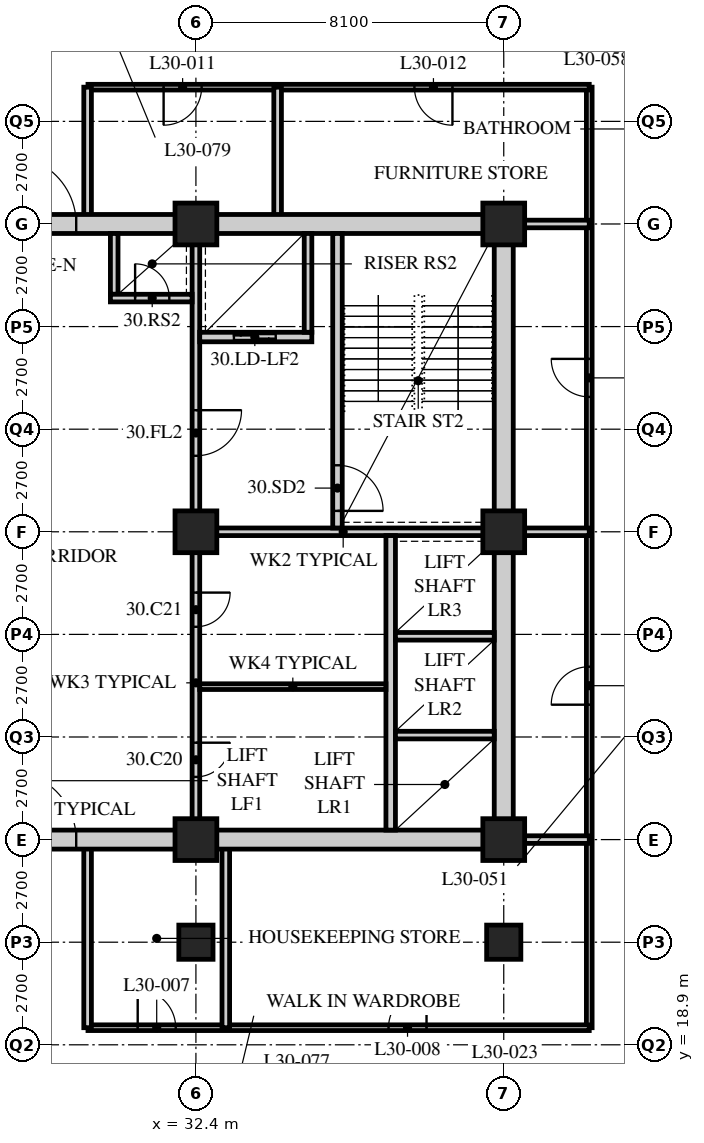
"""IFC4 building model, lengths in metres.
Left out: names, types, materials, properties, quantities, classifications, styles, units other than length and angle.
Written with IfcOpenShell. Run it as: python <this file> out.ifc"""

import sys

from ifc_helpers import new_model, si_unit, direction, frame, frame_2d, origin, origin_2d, place, context, subcontext, project, spatial, rectangle, hollow_rectangle, extrude, element, fill, save


model = new_model("IFC4")
c1 = context("Model", 3, precision=1e-05, world=origin(), true_north=direction((0.0, 1.0)))
c2 = subcontext(c1, "Body", "Model", "MODEL_VIEW")
j1 = project(units=[si_unit("LENGTHUNIT", "METRE"), si_unit("PLANEANGLEUNIT", "RADIAN")], contexts=[c1])
p1 = place(None, origin())
s1 = spatial("IfcSite", under=j1, at=p1, CompositionType="ELEMENT")
p2 = place(p1, origin())
s2 = spatial("IfcBuilding", under=s1, at=p2, CompositionType="ELEMENT")
p3 = place(p2, frame((0.0, 0.0, 120.4)))
s3 = spatial("IfcBuildingStorey", under=s2, at=p3, CompositionType="ELEMENT", Elevation=120.4)
p4 = place(p3, frame((32.4, 21.6, 0.0), z_axis=(0.0, 0.0, 1.0), x_axis=(1.0, 0.0, 0.0)))
e1 = element("IfcColumn", 1, at=p4, inside=s3, PredefinedType="COLUMN", context=c2, shape_type="SweptSolid", body=[
    extrude(hollow_rectangle(XDim=0.9, YDim=0.9, WallThickness=0.09, at=origin_2d()), origin(), (0.0, 0.0, 1.0), 3.4),
])
for number, where, z_axis, x_axis in (
    (2, (32.4, 24.3, 0.0), (0.0, 0.0, 1.0), (1.0, 0.0, 0.0)),
    (3, (32.4, 32.4, 0.0), (0.0, 0.0, 1.0), (1.0, 0.0, 0.0)),
    (4, (32.4, 40.5, 0.0), (0.0, 0.0, 1.0), (1.0, 0.0, 0.0)),
):
    element("IfcColumn", number, at=place(p3, frame(where, z_axis=z_axis, x_axis=x_axis)), inside=s3, PredefinedType="COLUMN", context=c2, shape_type="SweptSolid", body=[
        extrude(hollow_rectangle(XDim=1.1, YDim=1.1, WallThickness=0.1, at=origin_2d()), origin(), (0.0, 0.0, 1.0), 3.4),
    ])
p5 = place(p3, frame((40.5, 21.6, 0.0), z_axis=(0.0, 0.0, 1.0), x_axis=(1.0, 0.0, 0.0)))
e5 = element("IfcColumn", 5, at=p5, inside=s3, PredefinedType="COLUMN", context=c2, shape_type="SweptSolid", body=[
    extrude(hollow_rectangle(XDim=0.9, YDim=0.9, WallThickness=0.09, at=origin_2d()), origin(), (0.0, 0.0, 1.0), 3.4),
])
for number, where, z_axis, x_axis in (
    (6, (40.5, 24.3, 0.0), (0.0, 0.0, 1.0), (1.0, 0.0, 0.0)),
    (7, (40.5, 32.4, 0.0), (0.0, 0.0, 1.0), (1.0, 0.0, 0.0)),
    (8, (40.5, 40.5, 0.0), (0.0, 0.0, 1.0), (1.0, 0.0, 0.0)),
):
    element("IfcColumn", number, at=place(p3, frame(where, z_axis=z_axis, x_axis=x_axis)), inside=s3, PredefinedType="COLUMN", context=c2, shape_type="SweptSolid", body=[
        extrude(hollow_rectangle(XDim=1.1, YDim=1.1, WallThickness=0.1, at=origin_2d()), origin(), (0.0, 0.0, 1.0), 3.4),
    ])
p6 = place(p3, frame((42.75, 19.35, 0.0), z_axis=(0.0, 0.0, 1.0), x_axis=(0.0, 1.0, 0.0)))
e9 = element("IfcWall", 9, at=p6, inside=s3, PredefinedType="PARTITIONING", context=c2, shape_type="SweptSolid", body=[
    extrude(rectangle(XDim=24.75, YDim=0.15, at=frame_2d((12.375, 0.0))), origin(), (0.0, 0.0, 1.0), 3.19),
])
p7 = place(p6, frame((8.5, 0.0, 0.0)))
e10 = element("IfcOpeningElement", 10, at=p7, cuts=e9, PredefinedType="OPENING", context=c2, shape_type="SweptSolid", body=[
    extrude(rectangle(XDim=1.0, YDim=2.1, at=frame_2d((0.5, 1.05))), frame((0.0, 0.085, 0.0), z_axis=(0.0, -1.0, 0.0), x_axis=(1.0, 0.0, 0.0)), (0.0, 0.0, 1.0), 0.17),
])
p8 = place(p6, frame((16.6, 0.0, 0.0)))
e11 = element("IfcOpeningElement", 11, at=p8, cuts=e9, PredefinedType="OPENING", context=c2, shape_type="SweptSolid", body=[
    extrude(rectangle(XDim=1.0, YDim=2.1, at=frame_2d((0.5, 1.05))), frame((0.0, 0.085, 0.0), z_axis=(0.0, -1.0, 0.0), x_axis=(1.0, 0.0, 0.0)), (0.0, 0.0, 1.0), 0.17),
])
p9 = place(p3, frame((42.75, 44.1, 0.0), z_axis=(0.0, 0.0, 1.0), x_axis=(-1.0, 0.0, 0.0)))
e12 = element("IfcWall", 12, at=p9, inside=s3, PredefinedType="PARTITIONING", context=c2, shape_type="SweptSolid", body=[
    extrude(rectangle(XDim=13.19, YDim=0.15, at=frame_2d((6.595, 0.0))), origin(), (0.0, 0.0, 1.0), 3.19),
])
p10 = place(p9, frame((10.2, 0.0, 0.0)))
e13 = element("IfcOpeningElement", 13, at=p10, cuts=e12, PredefinedType="OPENING", context=c2, shape_type="SweptSolid", body=[
    extrude(rectangle(XDim=1.0, YDim=2.1, at=frame_2d((0.5, 1.05))), frame((0.0, 0.085, 0.0), z_axis=(0.0, -1.0, 0.0), x_axis=(1.0, 0.0, 0.0)), (0.0, 0.0, 1.0), 0.17),
])
p11 = place(p9, frame((3.6, 0.0, 0.0)))
e14 = element("IfcOpeningElement", 14, at=p11, cuts=e12, PredefinedType="OPENING", context=c2, shape_type="SweptSolid", body=[
    extrude(rectangle(XDim=1.0, YDim=2.1, at=frame_2d((0.5, 1.05))), frame((0.0, 0.085, 0.0), z_axis=(0.0, -1.0, 0.0), x_axis=(1.0, 0.0, 0.0)), (0.0, 0.0, 1.0), 0.17),
])
p12 = place(p3, frame((29.56, 19.35, 0.0), z_axis=(0.0, 0.0, 1.0), x_axis=(1.0, 0.0, 0.0)))
e15 = element("IfcWall", 15, at=p12, inside=s3, PredefinedType="PARTITIONING", context=c2, shape_type="SweptSolid", body=[
    extrude(rectangle(XDim=13.19, YDim=0.15, at=frame_2d((6.595, 0.0))), origin(), (0.0, 0.0, 1.0), 3.19),
])
p13 = place(p12, frame((1.308, 0.0, 0.0)))
e16 = element("IfcOpeningElement", 16, at=p13, cuts=e15, PredefinedType="OPENING", context=c2, shape_type="SweptSolid", body=[
    extrude(rectangle(XDim=1.0, YDim=2.1, at=frame_2d((0.5, 1.05))), frame((0.0, 0.085, 0.0), z_axis=(0.0, -1.0, 0.0), x_axis=(1.0, 0.0, 0.0)), (0.0, 0.0, 1.0), 0.17),
])
p14 = place(p12, frame((7.908, 0.0, 0.0)))
e17 = element("IfcOpeningElement", 17, at=p14, cuts=e15, PredefinedType="OPENING", context=c2, shape_type="SweptSolid", body=[
    extrude(rectangle(XDim=1.0, YDim=2.1, at=frame_2d((0.5, 1.05))), frame((0.0, 0.085, 0.0), z_axis=(0.0, -1.0, 0.0), x_axis=(1.0, 0.0, 0.0)), (0.0, 0.0, 1.0), 0.17),
])
p15 = place(p3, frame((40.5, 32.4, 0.0), z_axis=(0.0, 0.0, 1.0), x_axis=(1.0, 0.0, 0.0)))
e18 = element("IfcWall", 18, at=p15, inside=s3, PredefinedType="SOLIDWALL", context=c2, shape_type="SweptSolid", body=[
    extrude(rectangle(XDim=2.25, YDim=0.2, at=frame_2d((1.125, 0.0))), origin(), (0.0, 0.0, 1.0), 3.19),
])
for number, where, z_axis, x_axis in (
    (19, (33.186, 19.35, 0.0), (0.0, 0.0, 1.0), (0.0, 1.0, 0.0)),
    (20, (29.55, 19.35, 0.0), (0.0, 0.0, 1.0), (0.0, 1.0, 0.0)),
):
    element("IfcWall", number, at=place(p3, frame(where, z_axis=z_axis, x_axis=x_axis)), inside=s3, PredefinedType="SOLIDWALL", context=c2, shape_type="SweptSolid", body=[
        extrude(rectangle(XDim=4.95, YDim=0.2, at=frame_2d((2.475, 0.0))), origin(), (0.0, 0.0, 1.0), 3.19),
    ])
for number, where, z_axis, x_axis in (
    (21, (34.55, 44.1, 0.0), (0.0, 0.0, 1.0), (0.0, -1.0, 0.0)),
    (22, (29.55, 40.5, 0.0), (0.0, 0.0, 1.0), (0.0, 1.0, 0.0)),
):
    element("IfcWall", number, at=place(p3, frame(where, z_axis=z_axis, x_axis=x_axis)), inside=s3, PredefinedType="SOLIDWALL", context=c2, shape_type="SweptSolid", body=[
        extrude(rectangle(XDim=3.6, YDim=0.2, at=frame_2d((1.8, 0.0))), origin(), (0.0, 0.0, 1.0), 3.19),
    ])
for number, where, z_axis, x_axis in (
    (23, (40.5, 24.3, 0.0), (0.0, 0.0, 1.0), (1.0, 0.0, 0.0)),
    (24, (40.5, 40.5, 0.0), (0.0, 0.0, 1.0), (1.0, 0.0, 0.0)),
):
    element("IfcWall", number, at=place(p3, frame(where, z_axis=z_axis, x_axis=x_axis)), inside=s3, PredefinedType="SOLIDWALL", context=c2, shape_type="SweptSolid", body=[
        extrude(rectangle(XDim=2.25, YDim=0.2, at=frame_2d((1.125, 0.0))), origin(), (0.0, 0.0, 1.0), 3.19),
    ])
p16 = place(p3, frame((15.95, 24.3, 0.0), z_axis=(0.0, 0.0, 1.0), x_axis=(1.0, 0.0, 0.0)))
e25 = element("IfcWall", 25, at=p16, inside=s3, PredefinedType="SOLIDWALL", context=c2, shape_type="SweptSolid", body=[
    extrude(rectangle(XDim=24.8, YDim=0.5, at=frame_2d((12.4, 0.0))), origin(), (0.0, 0.0, 1.0), 2.54),
])
p17 = place(p16, frame((11.5, 0.0, 0.0)))
e26 = element("IfcOpeningElement", 26, at=p17, cuts=e25, PredefinedType="OPENING", context=c2, shape_type="SweptSolid", body=[
    extrude(rectangle(XDim=1.8, YDim=2.4, at=frame_2d((0.9, 1.2))), frame((0.0, 0.26, 0.0), z_axis=(0.0, -1.0, 0.0), x_axis=(1.0, 0.0, 0.0)), (0.0, 0.0, 1.0), 0.52),
])
p18 = place(p3, frame((15.95, 40.5, 0.0), z_axis=(0.0, 0.0, 1.0), x_axis=(1.0, 0.0, 0.0)))
e27 = element("IfcWall", 27, at=p18, inside=s3, PredefinedType="SOLIDWALL", context=c2, shape_type="SweptSolid", body=[
    extrude(rectangle(XDim=24.8, YDim=0.5, at=frame_2d((12.4, 0.0))), origin(), (0.0, 0.0, 1.0), 2.54),
])
p19 = place(p18, frame((11.5, 0.0, 0.0)))
e28 = element("IfcOpeningElement", 28, at=p19, cuts=e27, PredefinedType="OPENING", context=c2, shape_type="SweptSolid", body=[
    extrude(rectangle(XDim=1.8, YDim=2.4, at=frame_2d((0.9, 1.2))), frame((0.0, 0.26, 0.0), z_axis=(0.0, -1.0, 0.0), x_axis=(1.0, 0.0, 0.0)), (0.0, 0.0, 1.0), 0.52),
])
p20 = place(p3, frame((40.5, 24.55, 0.0), z_axis=(0.0, 0.0, 1.0), x_axis=(0.0, 1.0, 0.0)))
e29 = element("IfcWall", 29, at=p20, inside=s3, PredefinedType="SOLIDWALL", context=c2, shape_type="SweptSolid", body=[
    extrude(rectangle(XDim=15.7, YDim=0.5, at=frame_2d((7.85, 0.0))), origin(), (0.0, 0.0, 1.0), 2.578),
])
p21 = place(p3, frame((32.3, 32.4, 0.0), z_axis=(0.0, 0.0, 1.0), x_axis=(1.0, 0.0, 0.0)))
e30 = element("IfcWall", 30, at=p21, inside=s3, PredefinedType="SOLIDWALL", context=c2, shape_type="SweptSolid", body=[
    extrude(rectangle(XDim=7.95, YDim=0.2, at=frame_2d((3.975, 0.0))), origin(), (0.0, 0.0, 1.0), 2.578),
])
p22 = place(p3, frame((32.4, 32.5, 0.0), z_axis=(0.0, 0.0, 1.0), x_axis=(0.0, 1.0, 0.0)))
e31 = element("IfcWall", 31, at=p22, inside=s3, PredefinedType="SOLIDWALL", context=c2, shape_type="SweptSolid", body=[
    extrude(rectangle(XDim=7.75, YDim=0.2, at=frame_2d((3.875, 0.0))), origin(), (0.0, 0.0, 1.0), 2.578),
])
p23 = place(p22, frame((1.9, 0.0, 0.0)))
e32 = element("IfcOpeningElement", 32, at=p23, cuts=e31, PredefinedType="OPENING", context=c2, shape_type="SweptSolid", body=[
    extrude(rectangle(XDim=1.2, YDim=2.1, at=frame_2d((0.6, 1.05))), frame((0.0, 0.11, 0.0), z_axis=(0.0, -1.0, 0.0), x_axis=(1.0, 0.0, 0.0)), (0.0, 0.0, 1.0), 0.22),
])
p24 = place(p3, frame((37.525, 24.55, 0.0), z_axis=(0.0, 0.0, 1.0), x_axis=(0.0, 1.0, 0.0)))
e33 = element("IfcWall", 33, at=p24, inside=s3, PredefinedType="SOLIDWALL", context=c2, shape_type="SweptSolid", body=[
    extrude(rectangle(XDim=7.75, YDim=0.25, at=frame_2d((3.875, 0.0))), origin(), (0.0, 0.0, 1.0), 3.19),
])
for number, where, z_axis, x_axis in (
    (34, (37.65, 27.05, 0.0), (0.0, 0.0, 1.0), (1.0, 0.0, 0.0)),
    (35, (37.65, 29.65, 0.0), (0.0, 0.0, 1.0), (1.0, 0.0, 0.0)),
):
    element("IfcWall", number, at=place(p3, frame(where, z_axis=z_axis, x_axis=x_axis)), inside=s3, PredefinedType="SOLIDWALL", context=c2, shape_type="SweptSolid", body=[
        extrude(rectangle(XDim=2.6, YDim=0.2, at=frame_2d((1.3, 0.0))), origin(), (0.0, 0.0, 1.0), 3.19),
    ])
p25 = place(p3, frame((36.125, 32.5, 0.0), z_axis=(0.0, 0.0, 1.0), x_axis=(0.0, 1.0, 0.0)))
e36 = element("IfcWall", 36, at=p25, inside=s3, PredefinedType="SOLIDWALL", context=c2, shape_type="SweptSolid", body=[
    extrude(rectangle(XDim=7.75, YDim=0.25, at=frame_2d((3.875, 0.0))), origin(), (0.0, 0.0, 1.0), 3.19),
])
p26 = place(p25, frame((0.45, 0.0, 0.0)))
e37 = element("IfcOpeningElement", 37, at=p26, cuts=e36, PredefinedType="OPENING", context=c2, shape_type="SweptSolid", body=[
    extrude(rectangle(XDim=1.2, YDim=2.1, at=frame_2d((0.6, 1.05))), frame((0.0, 0.135, 0.0), z_axis=(0.0, -1.0, 0.0), x_axis=(1.0, 0.0, 0.0)), (0.0, 0.0, 1.0), 0.27),
])
p27 = place(p3, frame((32.5, 37.525, 0.0), z_axis=(0.0, 0.0, 1.0), x_axis=(1.0, 0.0, 0.0)))
e38 = element("IfcWall", 38, at=p27, inside=s3, PredefinedType="SOLIDWALL", context=c2, shape_type="SweptSolid", body=[
    extrude(rectangle(XDim=2.95, YDim=0.25, at=frame_2d((1.475, 0.0))), origin(), (0.0, 0.0, 1.0), 3.19),
])
p28 = place(p27, frame((0.9, 0.0, 0.0)))
e39 = element("IfcOpeningElement", 39, at=p28, cuts=e38, PredefinedType="OPENING", context=c2, shape_type="SweptSolid", body=[
    extrude(rectangle(XDim=1.1, YDim=2.4, at=frame_2d((0.55, 1.2))), frame((0.0, 0.135, 0.0), z_axis=(0.0, -1.0, 0.0), x_axis=(1.0, 0.0, 0.0)), (0.0, 0.0, 1.0), 0.27),
])
p29 = place(p3, frame((35.35, 37.65, 0.0), z_axis=(0.0, 0.0, 1.0), x_axis=(0.0, 1.0, 0.0)))
e40 = element("IfcWall", 40, at=p29, inside=s3, PredefinedType="SOLIDWALL", context=c2, shape_type="SweptSolid", body=[
    extrude(rectangle(XDim=2.6, YDim=0.2, at=frame_2d((1.3, 0.0))), origin(), (0.0, 0.0, 1.0), 3.19),
])
p30 = place(p3, frame((30.25, 38.65, 0.0), z_axis=(0.0, 0.0, 1.0), x_axis=(0.0, 1.0, 0.0)))
e41 = element("IfcWall", 41, at=p30, inside=s3, PredefinedType="SOLIDWALL", context=c2, shape_type="SweptSolid", body=[
    extrude(rectangle(XDim=1.6, YDim=0.2, at=frame_2d((0.8, 0.0))), origin(), (0.0, 0.0, 1.0), 3.19),
])
p31 = place(p3, frame((30.15, 38.55, 0.0), z_axis=(0.0, 0.0, 1.0), x_axis=(1.0, 0.0, 0.0)))
e42 = element("IfcWall", 42, at=p31, inside=s3, PredefinedType="SOLIDWALL", context=c2, shape_type="SweptSolid", body=[
    extrude(rectangle(XDim=2.15, YDim=0.2, at=frame_2d((1.075, 0.0))), origin(), (0.0, 0.0, 1.0), 3.19),
])
p32 = place(p31, frame((0.65, 0.0, 0.0)))
e43 = element("IfcOpeningElement", 43, at=p32, cuts=e42, PredefinedType="OPENING", context=c2, shape_type="SweptSolid", body=[
    extrude(rectangle(XDim=0.9, YDim=2.1, at=frame_2d((0.45, 1.05))), frame((0.0, 0.11, 0.0), z_axis=(0.0, -1.0, 0.0), x_axis=(1.0, 0.0, 0.0)), (0.0, 0.0, 1.0), 0.22),
])
p33 = place(p3, frame((32.4, 24.55, 0.0), z_axis=(0.0, 0.0, 1.0), x_axis=(0.0, 1.0, 0.0)))
e44 = element("IfcWall", 44, at=p33, inside=s3, PredefinedType="PARTITIONING", context=c2, shape_type="SweptSolid", body=[
    extrude(rectangle(XDim=7.75, YDim=0.2, at=frame_2d((3.875, 0.0))), origin(), (0.0, 0.0, 1.0), 2.578),
])
p34 = place(p33, frame((1.4, 0.0, 0.0)))
e45 = element("IfcOpeningElement", 45, at=p34, cuts=e44, PredefinedType="OPENING", context=c2, shape_type="SweptSolid", body=[
    extrude(rectangle(XDim=0.9, YDim=2.1, at=frame_2d((0.45, 1.05))), frame((0.0, 0.11, 0.0), z_axis=(0.0, -1.0, 0.0), x_axis=(1.0, 0.0, 0.0)), (0.0, 0.0, 1.0), 0.22),
])
p35 = place(p33, frame((5.35, 0.0, 0.0)))
e46 = element("IfcOpeningElement", 46, at=p35, cuts=e44, PredefinedType="OPENING", context=c2, shape_type="SweptSolid", body=[
    extrude(rectangle(XDim=0.9, YDim=2.1, at=frame_2d((0.45, 1.05))), frame((0.0, 0.11, 0.0), z_axis=(0.0, -1.0, 0.0), x_axis=(1.0, 0.0, 0.0)), (0.0, 0.0, 1.0), 0.22),
])
p36 = place(p3, frame((32.5, 28.325, 0.0), z_axis=(0.0, 0.0, 1.0), x_axis=(1.0, 0.0, 0.0)))
e47 = element("IfcWall", 47, at=p36, inside=s3, PredefinedType="PARTITIONING", context=c2, shape_type="SweptSolid", body=[
    extrude(rectangle(XDim=4.9, YDim=0.15, at=frame_2d((2.45, 0.0))), origin(), (0.0, 0.0, 1.0), 3.19),
])
p37 = place(p7, origin())
e48 = element("IfcDoor", 48, at=p37, inside=s3, OperationType="SINGLE_SWING_LEFT", PredefinedType="DOOR", context=c2, shape_type="SweptSolid", body=[
    extrude(rectangle(XDim=1.0, YDim=2.1, at=frame_2d((0.5, 1.05))), frame((0.0, 0.025, 0.0), z_axis=(0.0, -1.0, 0.0), x_axis=(1.0, 0.0, 0.0)), (0.0, 0.0, 1.0), 0.05),
])
fill(e10, e48)
p38 = place(p8, origin())
e49 = element("IfcDoor", 49, at=p38, inside=s3, OperationType="SINGLE_SWING_RIGHT", PredefinedType="DOOR", context=c2, shape_type="SweptSolid", body=[
    extrude(rectangle(XDim=1.0, YDim=2.1, at=frame_2d((0.5, 1.05))), frame((0.0, 0.025, 0.0), z_axis=(0.0, -1.0, 0.0), x_axis=(1.0, 0.0, 0.0)), (0.0, 0.0, 1.0), 0.05),
])
fill(e11, e49)
p39 = place(p13, origin())
e50 = element("IfcDoor", 50, at=p39, inside=s3, OperationType="SINGLE_SWING_LEFT", PredefinedType="DOOR", context=c2, shape_type="SweptSolid", body=[
    extrude(rectangle(XDim=1.0, YDim=2.1, at=frame_2d((0.5, 1.05))), frame((0.0, 0.025, 0.0), z_axis=(0.0, -1.0, 0.0), x_axis=(1.0, 0.0, 0.0)), (0.0, 0.0, 1.0), 0.05),
])
fill(e16, e50)
p40 = place(p14, origin())
e51 = element("IfcDoor", 51, at=p40, inside=s3, OperationType="SINGLE_SWING_RIGHT", PredefinedType="DOOR", context=c2, shape_type="SweptSolid", body=[
    extrude(rectangle(XDim=1.0, YDim=2.1, at=frame_2d((0.5, 1.05))), frame((0.0, 0.025, 0.0), z_axis=(0.0, -1.0, 0.0), x_axis=(1.0, 0.0, 0.0)), (0.0, 0.0, 1.0), 0.05),
])
fill(e17, e51)
p41 = place(p10, origin())
e52 = element("IfcDoor", 52, at=p41, inside=s3, OperationType="SINGLE_SWING_RIGHT", PredefinedType="DOOR", context=c2, shape_type="SweptSolid", body=[
    extrude(rectangle(XDim=1.0, YDim=2.1, at=frame_2d((0.5, 1.05))), frame((0.0, 0.025, 0.0), z_axis=(0.0, -1.0, 0.0), x_axis=(1.0, 0.0, 0.0)), (0.0, 0.0, 1.0), 0.05),
])
fill(e13, e52)
p42 = place(p11, origin())
e53 = element("IfcDoor", 53, at=p42, inside=s3, OperationType="SINGLE_SWING_LEFT", PredefinedType="DOOR", context=c2, shape_type="SweptSolid", body=[
    extrude(rectangle(XDim=1.0, YDim=2.1, at=frame_2d((0.5, 1.05))), frame((0.0, 0.025, 0.0), z_axis=(0.0, -1.0, 0.0), x_axis=(1.0, 0.0, 0.0)), (0.0, 0.0, 1.0), 0.05),
])
fill(e14, e53)
p43 = place(p34, origin())
e54 = element("IfcDoor", 54, at=p43, inside=s3, OperationType="SINGLE_SWING_LEFT", PredefinedType="DOOR", context=c2, shape_type="SweptSolid", body=[
    extrude(rectangle(XDim=0.9, YDim=2.1, at=frame_2d((0.45, 1.05))), frame((0.0, 0.025, 0.0), z_axis=(0.0, -1.0, 0.0), x_axis=(1.0, 0.0, 0.0)), (0.0, 0.0, 1.0), 0.05),
])
fill(e45, e54)
p44 = place(p35, origin())
e55 = element("IfcDoor", 55, at=p44, inside=s3, OperationType="SINGLE_SWING_LEFT", PredefinedType="DOOR", context=c2, shape_type="SweptSolid", body=[
    extrude(rectangle(XDim=0.9, YDim=2.1, at=frame_2d((0.45, 1.05))), frame((0.0, 0.025, 0.0), z_axis=(0.0, -1.0, 0.0), x_axis=(1.0, 0.0, 0.0)), (0.0, 0.0, 1.0), 0.05),
])
fill(e46, e55)
p45 = place(p26, origin())
e56 = element("IfcDoor", 56, at=p45, inside=s3, OperationType="SINGLE_SWING_RIGHT", PredefinedType="DOOR", context=c2, shape_type="SweptSolid", body=[
    extrude(rectangle(XDim=1.2, YDim=2.1, at=frame_2d((0.6, 1.05))), frame((0.0, 0.025, 0.0), z_axis=(0.0, -1.0, 0.0), x_axis=(1.0, 0.0, 0.0)), (0.0, 0.0, 1.0), 0.05),
])
fill(e37, e56)
p46 = place(p23, origin())
e57 = element("IfcDoor", 57, at=p46, inside=s3, OperationType="SINGLE_SWING_LEFT", PredefinedType="DOOR", context=c2, shape_type="SweptSolid", body=[
    extrude(rectangle(XDim=1.2, YDim=2.1, at=frame_2d((0.6, 1.05))), frame((0.0, 0.025, 0.0), z_axis=(0.0, -1.0, 0.0), x_axis=(1.0, 0.0, 0.0)), (0.0, 0.0, 1.0), 0.05),
])
fill(e32, e57)
p47 = place(p32, origin())
e58 = element("IfcDoor", 58, at=p47, inside=s3, OperationType="SINGLE_SWING_LEFT", PredefinedType="DOOR", context=c2, shape_type="SweptSolid", body=[
    extrude(rectangle(XDim=0.9, YDim=2.1, at=frame_2d((0.45, 1.05))), frame((0.0, 0.025, 0.0), z_axis=(0.0, -1.0, 0.0), x_axis=(1.0, 0.0, 0.0)), (0.0, 0.0, 1.0), 0.05),
])
fill(e43, e58)
p48 = place(p28, origin())
e59 = element("IfcDoor", 59, at=p48, inside=s3, OperationType="DOUBLE_DOOR_SLIDING", PredefinedType="DOOR", context=c2, shape_type="SweptSolid", body=[
    extrude(rectangle(XDim=1.1, YDim=2.4, at=frame_2d((0.55, 1.2))), frame((0.0, 0.025, 0.0), z_axis=(0.0, -1.0, 0.0), x_axis=(1.0, 0.0, 0.0)), (0.0, 0.0, 1.0), 0.05),
])
fill(e39, e59)
p49 = place(p17, origin())
e60 = element("IfcDoor", 60, at=p49, inside=s3, OperationType="DOUBLE_DOOR_SINGLE_SWING", PredefinedType="DOOR", context=c2, shape_type="SweptSolid", body=[
    extrude(rectangle(XDim=1.8, YDim=2.4, at=frame_2d((0.9, 1.2))), frame((0.0, 0.025, 0.0), z_axis=(0.0, -1.0, 0.0), x_axis=(1.0, 0.0, 0.0)), (0.0, 0.0, 1.0), 0.05),
])
fill(e26, e60)
p50 = place(p19, origin())
e61 = element("IfcDoor", 61, at=p50, inside=s3, OperationType="DOUBLE_DOOR_SINGLE_SWING", PredefinedType="DOOR", context=c2, shape_type="SweptSolid", body=[
    extrude(rectangle(XDim=1.8, YDim=2.4, at=frame_2d((0.9, 1.2))), frame((0.0, 0.025, 0.0), z_axis=(0.0, -1.0, 0.0), x_axis=(1.0, 0.0, 0.0)), (0.0, 0.0, 1.0), 0.05),
])
fill(e28, e61)
save(model, sys.argv[1])
